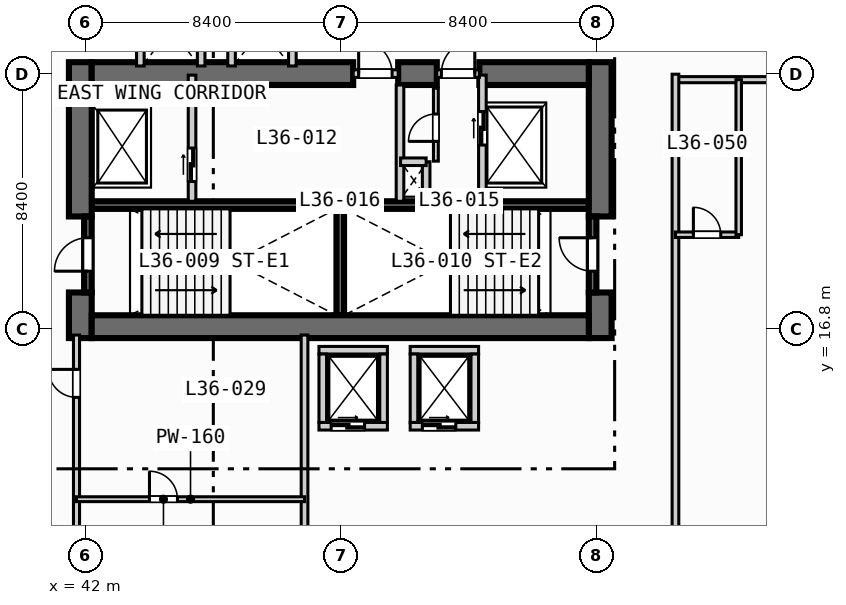
"""IFC4 building model, lengths in metres.
Left out: names, types, materials, properties, quantities, classifications, styles, units other than length and angle.
Written with IfcOpenShell. Run it as: python <this file> out.ifc"""

import sys

from ifc_helpers import new_model, si_unit, direction, frame, frame_2d, origin, place, context, subcontext, project, spatial, rectangle, extrude, element, fill, save


model = new_model("IFC4")
c1 = context("Model", 3, precision=1e-05, world=origin(), true_north=direction((0.0, 1.0)))
c2 = subcontext(c1, "Body", "Model", "MODEL_VIEW")
j1 = project(units=[si_unit("LENGTHUNIT", "METRE"), si_unit("PLANEANGLEUNIT", "RADIAN")], contexts=[c1])
p1 = place(None, origin())
s1 = spatial("IfcSite", under=j1, at=p1, CompositionType="ELEMENT")
p2 = place(p1, origin())
s2 = spatial("IfcBuilding", under=s1, at=p2, CompositionType="ELEMENT")
p3 = place(p2, frame((0.0, 0.0, 149.4)))
s3 = spatial("IfcBuildingStorey", under=s2, at=p3, CompositionType="ELEMENT", Elevation=149.4)
for number, where, z_axis, x_axis in (
    (1, (42.2, 20.875, 0.0), (0.0, 0.0, 1.0), (1.0, 0.0, 0.0)),
    (2, (50.5, 20.875, 0.0), (0.0, 0.0, 1.0), (1.0, 0.0, 0.0)),
):
    element("IfcWall", number, at=place(p3, frame(where, z_axis=z_axis, x_axis=x_axis)), inside=s3, PredefinedType="SOLIDWALL", context=c2, shape_type="SweptSolid", body=[
        extrude(rectangle(XDim=8.05, YDim=0.25, at=frame_2d((4.025, 0.0))), origin(), (0.0, 0.0, 1.0), 3.55),
    ])
p4 = place(p3, frame((50.375, 17.25, 0.0), z_axis=(0.0, 0.0, 1.0), x_axis=(0.0, 1.0, 0.0)))
e3 = element("IfcWall", 3, at=p4, inside=s3, PredefinedType="SOLIDWALL", context=c2, shape_type="SweptSolid", body=[
    extrude(rectangle(XDim=3.5, YDim=0.25, at=frame_2d((1.75, 0.0))), origin(), (0.0, 0.0, 1.0), 3.55),
])
p5 = place(p3, frame((41.825, 16.5, 0.0), z_axis=(0.0, 0.0, 1.0), x_axis=(0.0, 1.0, 0.0)))
e4 = element("IfcWall", 4, at=p5, inside=s3, PredefinedType="SHEAR", context=c2, shape_type="SweptSolid", body=[
    extrude(rectangle(XDim=1.5, YDim=0.75, at=frame_2d((0.75, 0.0))), origin(), (0.0, 0.0, 1.0), 3.55),
])
p6 = place(p3, frame((41.825, 20.5, 0.0), z_axis=(0.0, 0.0, 1.0), x_axis=(0.0, 1.0, 0.0)))
e5 = element("IfcWall", 5, at=p6, inside=s3, PredefinedType="SHEAR", context=c2, shape_type="SweptSolid", body=[
    extrude(rectangle(XDim=5.075, YDim=0.75, at=frame_2d((2.538, 0.0))), origin(), (0.0, 0.0, 1.0), 3.55),
])
p7 = place(p3, frame((58.925, 16.5, 0.0), z_axis=(0.0, 0.0, 1.0), x_axis=(0.0, 1.0, 0.0)))
e6 = element("IfcWall", 6, at=p7, inside=s3, PredefinedType="SHEAR", context=c2, shape_type="SweptSolid", body=[
    extrude(rectangle(XDim=1.5, YDim=0.75, at=frame_2d((0.75, 0.0))), origin(), (0.0, 0.0, 1.0), 3.55),
])
p8 = place(p3, frame((58.925, 20.5, 0.0), z_axis=(0.0, 0.0, 1.0), x_axis=(0.0, 1.0, 0.0)))
e7 = element("IfcWall", 7, at=p8, inside=s3, PredefinedType="SHEAR", context=c2, shape_type="SweptSolid", body=[
    extrude(rectangle(XDim=5.075, YDim=0.75, at=frame_2d((2.538, 0.0))), origin(), (0.0, 0.0, 1.0), 3.55),
])
p9 = place(p3, frame((42.2, 16.875, 0.0), z_axis=(0.0, 0.0, 1.0), x_axis=(1.0, 0.0, 0.0)))
e8 = element("IfcWall", 8, at=p9, inside=s3, PredefinedType="SHEAR", context=c2, shape_type="SweptSolid", body=[
    extrude(rectangle(XDim=16.35, YDim=0.75, at=frame_2d((8.175, 0.0))), origin(), (0.0, 0.0, 1.0), 3.55),
])
p10 = place(p3, frame((42.2, 25.2, 0.0), z_axis=(0.0, 0.0, 1.0), x_axis=(1.0, 0.0, 0.0)))
e9 = element("IfcWall", 9, at=p10, inside=s3, PredefinedType="SHEAR", context=c2, shape_type="SweptSolid", body=[
    extrude(rectangle(XDim=8.6, YDim=0.75, at=frame_2d((4.3, 0.0))), origin(), (0.0, 0.0, 1.0), 3.55),
])
p11 = place(p3, frame((52.28, 25.2, 0.0), z_axis=(0.0, 0.0, 1.0), x_axis=(1.0, 0.0, 0.0)))
e10 = element("IfcWall", 10, at=p11, inside=s3, PredefinedType="SHEAR", context=c2, shape_type="SweptSolid", body=[
    extrude(rectangle(XDim=1.27, YDim=0.75, at=frame_2d((0.635, 0.0))), origin(), (0.0, 0.0, 1.0), 3.55),
])
p12 = place(p3, frame((54.95, 25.2, 0.0), z_axis=(0.0, 0.0, 1.0), x_axis=(1.0, 0.0, 0.0)))
e11 = element("IfcWall", 11, at=p12, inside=s3, PredefinedType="SHEAR", context=c2, shape_type="SweptSolid", body=[
    extrude(rectangle(XDim=3.6, YDim=0.75, at=frame_2d((1.8, 0.0))), origin(), (0.0, 0.0, 1.0), 3.55),
])
p13 = place(p3, frame((42.075, 18.0, 0.0), z_axis=(0.0, 0.0, 1.0), x_axis=(0.0, 1.0, 0.0)))
e12 = element("IfcWall", 12, at=p13, inside=s3, PredefinedType="SOLIDWALL", context=c2, shape_type="SweptSolid", body=[
    extrude(rectangle(XDim=2.5, YDim=0.25, at=frame_2d((1.25, 0.0))), origin(), (0.0, 0.0, 1.0), 3.55),
])
p14 = place(p13, frame((0.7, 0.0, 0.0)))
e13 = element("IfcOpeningElement", 13, at=p14, cuts=e12, PredefinedType="OPENING", context=c2, shape_type="SweptSolid", body=[
    extrude(rectangle(XDim=1.1, YDim=2.15, at=frame_2d((0.55, 1.075))), frame((0.0, 0.135, 0.0), z_axis=(0.0, -1.0, 0.0), x_axis=(1.0, 0.0, 0.0)), (0.0, 0.0, 1.0), 0.27),
])
p15 = place(p3, frame((58.675, 18.0, 0.0), z_axis=(0.0, 0.0, 1.0), x_axis=(0.0, 1.0, 0.0)))
e14 = element("IfcWall", 14, at=p15, inside=s3, PredefinedType="SOLIDWALL", context=c2, shape_type="SweptSolid", body=[
    extrude(rectangle(XDim=2.5, YDim=0.25, at=frame_2d((1.25, 0.0))), origin(), (0.0, 0.0, 1.0), 3.55),
])
p16 = place(p15, frame((0.7, 0.0, 0.0)))
e15 = element("IfcOpeningElement", 15, at=p16, cuts=e14, PredefinedType="OPENING", context=c2, shape_type="SweptSolid", body=[
    extrude(rectangle(XDim=1.1, YDim=2.15, at=frame_2d((0.55, 1.075))), frame((0.0, 0.135, 0.0), z_axis=(0.0, -1.0, 0.0), x_axis=(1.0, 0.0, 0.0)), (0.0, 0.0, 1.0), 0.27),
])
p17 = place(p3, frame((45.5, 21.0, 0.0), z_axis=(0.0, 0.0, 1.0), x_axis=(0.0, 1.0, 0.0)))
e16 = element("IfcWall", 16, at=p17, inside=s3, PredefinedType="SOLIDWALL", context=c2, shape_type="SweptSolid", body=[
    extrude(rectangle(XDim=4.15, YDim=0.25, at=frame_2d((2.075, 0.0))), origin(), (0.0, 0.0, 1.0), 3.55),
])
p18 = place(p17, frame((0.65, 0.0, 0.0)))
e17 = element("IfcOpeningElement", 17, at=p18, cuts=e16, PredefinedType="OPENING", context=c2, shape_type="SweptSolid", body=[
    extrude(rectangle(XDim=1.1, YDim=2.15, at=frame_2d((0.55, 1.075))), frame((0.0, 0.135, 0.0), z_axis=(0.0, -1.0, 0.0), x_axis=(1.0, 0.0, 0.0)), (0.0, 0.0, 1.0), 0.27),
])
p19 = place(p3, frame((50.8, 25.2, 0.0), z_axis=(0.0, 0.0, 1.0), x_axis=(1.0, 0.0, 0.0)))
e18 = element("IfcWall", 18, at=p19, inside=s3, PredefinedType="SOLIDWALL", context=c2, shape_type="SweptSolid", body=[
    extrude(rectangle(XDim=1.48, YDim=0.25, at=frame_2d((0.74, 0.0))), origin(), (0.0, 0.0, 1.0), 3.55),
])
p20 = place(p19, frame((0.18, 0.0, 0.0)))
e19 = element("IfcOpeningElement", 19, at=p20, cuts=e18, PredefinedType="OPENING", context=c2, shape_type="SweptSolid", body=[
    extrude(rectangle(XDim=1.1, YDim=2.15, at=frame_2d((0.55, 1.075))), frame((0.0, 0.135, 0.0), z_axis=(0.0, -1.0, 0.0), x_axis=(1.0, 0.0, 0.0)), (0.0, 0.0, 1.0), 0.27),
])
p21 = place(p3, frame((52.34, 21.0, 0.0), z_axis=(0.0, 0.0, 1.0), x_axis=(0.0, 1.0, 0.0)))
e20 = element("IfcWall", 20, at=p21, inside=s3, PredefinedType="SOLIDWALL", context=c2, shape_type="SweptSolid", body=[
    extrude(rectangle(XDim=3.825, YDim=0.25, at=frame_2d((1.913, 0.0))), origin(), (0.0, 0.0, 1.0), 3.55),
])
p22 = place(p3, frame((55.05, 21.0, 0.0), z_axis=(0.0, 0.0, 1.0), x_axis=(0.0, 1.0, 0.0)))
e21 = element("IfcWall", 21, at=p22, inside=s3, PredefinedType="SOLIDWALL", context=c2, shape_type="SweptSolid", body=[
    extrude(rectangle(XDim=4.15, YDim=0.25, at=frame_2d((2.075, 0.0))), origin(), (0.0, 0.0, 1.0), 3.55),
])
p23 = place(p22, frame((1.85, 0.0, 0.0)))
e22 = element("IfcOpeningElement", 22, at=p23, cuts=e21, PredefinedType="OPENING", context=c2, shape_type="SweptSolid", body=[
    extrude(rectangle(XDim=1.1, YDim=2.15, at=frame_2d((0.55, 1.075))), frame((0.0, 0.135, 0.0), z_axis=(0.0, -1.0, 0.0), x_axis=(1.0, 0.0, 0.0)), (0.0, 0.0, 1.0), 0.27),
])
p24 = place(p3, frame((53.55, 25.2, 0.0), z_axis=(0.0, 0.0, 1.0), x_axis=(1.0, 0.0, 0.0)))
e23 = element("IfcWall", 23, at=p24, inside=s3, PredefinedType="SOLIDWALL", context=c2, shape_type="SweptSolid", body=[
    extrude(rectangle(XDim=1.4, YDim=0.25, at=frame_2d((0.7, 0.0))), origin(), (0.0, 0.0, 1.0), 3.55),
])
p25 = place(p24, frame((0.15, 0.0, 0.0)))
e24 = element("IfcOpeningElement", 24, at=p25, cuts=e23, PredefinedType="OPENING", context=c2, shape_type="SweptSolid", body=[
    extrude(rectangle(XDim=1.1, YDim=2.15, at=frame_2d((0.55, 1.075))), frame((0.0, 0.135, 0.0), z_axis=(0.0, -1.0, 0.0), x_axis=(1.0, 0.0, 0.0)), (0.0, 0.0, 1.0), 0.27),
])
p26 = place(p3, frame((53.2, 21.0, 0.0), z_axis=(0.0, 0.0, 1.0), x_axis=(0.0, 1.0, 0.0)))
e25 = element("IfcWall", 25, at=p26, inside=s3, PredefinedType="SOLIDWALL", context=c2, shape_type="SweptSolid", body=[
    extrude(rectangle(XDim=1.3, YDim=0.25, at=frame_2d((0.65, 0.0))), origin(), (0.0, 0.0, 1.0), 3.55),
])
p27 = place(p3, frame((52.36, 22.3, 0.0), z_axis=(0.0, 0.0, 1.0), x_axis=(1.0, 0.0, 0.0)))
e26 = element("IfcWall", 26, at=p27, inside=s3, PredefinedType="SOLIDWALL", context=c2, shape_type="SweptSolid", body=[
    extrude(rectangle(XDim=0.84, YDim=0.25, at=frame_2d((0.42, 0.0))), origin(), (0.0, 0.0, 1.0), 3.55),
])
p28 = place(p3, frame((53.52, 22.32, 0.0), z_axis=(0.0, 0.0, 1.0), x_axis=(0.0, 1.0, 0.0)))
e27 = element("IfcWall", 27, at=p28, inside=s3, PredefinedType="PARTITIONING", context=c2, shape_type="SweptSolid", body=[
    extrude(rectangle(XDim=2.4, YDim=0.16, at=frame_2d((1.2, 0.0))), origin(), (0.0, 0.0, 1.0), 3.55),
])
p29 = place(p28, frame((0.65, 0.0, 0.0)))
e28 = element("IfcOpeningElement", 28, at=p29, cuts=e27, PredefinedType="OPENING", context=c2, shape_type="SweptSolid", body=[
    extrude(rectangle(XDim=0.9, YDim=2.1, at=frame_2d((0.45, 1.05))), frame((0.0, 0.09, 0.0), z_axis=(0.0, -1.0, 0.0), x_axis=(1.0, 0.0, 0.0)), (0.0, 0.0, 1.0), 0.18),
])
p30 = place(p3, frame((49.675, 13.6, 0.0), z_axis=(0.0, 0.0, 1.0), x_axis=(1.0, 0.0, 0.0)))
e29 = element("IfcWall", 29, at=p30, inside=s3, PredefinedType="SOLIDWALL", context=c2, shape_type="SweptSolid", body=[
    extrude(rectangle(XDim=2.25, YDim=0.25, at=frame_2d((1.125, 0.0))), origin(), (0.0, 0.0, 1.0), 3.55),
])
p31 = place(p30, frame((0.4, 0.0, 0.0)))
e30 = element("IfcOpeningElement", 30, at=p31, cuts=e29, PredefinedType="OPENING", context=c2, shape_type="SweptSolid", body=[
    extrude(rectangle(XDim=1.1, YDim=2.15, at=frame_2d((0.55, 1.075))), frame((0.0, 0.135, 0.0), z_axis=(0.0, -1.0, 0.0), x_axis=(1.0, 0.0, 0.0)), (0.0, 0.0, 1.0), 0.27),
])
for number, where, z_axis, x_axis in (
    (31, (49.675, 16.1, 0.0), (0.0, 0.0, 1.0), (1.0, 0.0, 0.0)),
    (32, (49.8, 13.725, 0.0), (0.0, 0.0, 1.0), (0.0, 1.0, 0.0)),
    (33, (51.8, 13.725, 0.0), (0.0, 0.0, 1.0), (0.0, 1.0, 0.0)),
):
    element("IfcWall", number, at=place(p3, frame(where, z_axis=z_axis, x_axis=x_axis)), inside=s3, PredefinedType="SOLIDWALL", context=c2, shape_type="SweptSolid", body=[
        extrude(rectangle(XDim=2.25, YDim=0.25, at=frame_2d((1.125, 0.0))), origin(), (0.0, 0.0, 1.0), 3.55),
    ])
p32 = place(p3, frame((52.675, 13.6, 0.0), z_axis=(0.0, 0.0, 1.0), x_axis=(1.0, 0.0, 0.0)))
e34 = element("IfcWall", 34, at=p32, inside=s3, PredefinedType="SOLIDWALL", context=c2, shape_type="SweptSolid", body=[
    extrude(rectangle(XDim=2.25, YDim=0.25, at=frame_2d((1.125, 0.0))), origin(), (0.0, 0.0, 1.0), 3.55),
])
p33 = place(p32, frame((0.4, 0.0, 0.0)))
e35 = element("IfcOpeningElement", 35, at=p33, cuts=e34, PredefinedType="OPENING", context=c2, shape_type="SweptSolid", body=[
    extrude(rectangle(XDim=1.1, YDim=2.15, at=frame_2d((0.55, 1.075))), frame((0.0, 0.135, 0.0), z_axis=(0.0, -1.0, 0.0), x_axis=(1.0, 0.0, 0.0)), (0.0, 0.0, 1.0), 0.27),
])
for number, where, z_axis, x_axis in (
    (36, (52.675, 16.1, 0.0), (0.0, 0.0, 1.0), (1.0, 0.0, 0.0)),
    (37, (52.8, 13.725, 0.0), (0.0, 0.0, 1.0), (0.0, 1.0, 0.0)),
    (38, (54.8, 13.725, 0.0), (0.0, 0.0, 1.0), (0.0, 1.0, 0.0)),
):
    element("IfcWall", number, at=place(p3, frame(where, z_axis=z_axis, x_axis=x_axis)), inside=s3, PredefinedType="SOLIDWALL", context=c2, shape_type="SweptSolid", body=[
        extrude(rectangle(XDim=2.25, YDim=0.25, at=frame_2d((1.125, 0.0))), origin(), (0.0, 0.0, 1.0), 3.55),
    ])
for number, where, z_axis, x_axis in (
    (39, (43.8, 25.45, 0.0), (0.0, 0.0, 1.0), (0.0, 1.0, 0.0)),
    (40, (45.8, 25.45, 0.0), (0.0, 0.0, 1.0), (0.0, 1.0, 0.0)),
    (41, (46.8, 25.45, 0.0), (0.0, 0.0, 1.0), (0.0, 1.0, 0.0)),
    (42, (48.8, 25.45, 0.0), (0.0, 0.0, 1.0), (0.0, 1.0, 0.0)),
):
    element("IfcWall", number, at=place(p3, frame(where, z_axis=z_axis, x_axis=x_axis)), inside=s3, PredefinedType="SOLIDWALL", context=c2, shape_type="SweptSolid", body=[
        extrude(rectangle(XDim=2.325, YDim=0.25, at=frame_2d((1.163, 0.0))), origin(), (0.0, 0.0, 1.0), 3.55),
    ])
p34 = place(p3, frame((41.7, 0.35, 0.0), z_axis=(0.0, 0.0, 1.0), x_axis=(0.0, 1.0, 0.0)))
e43 = element("IfcWall", 43, at=p34, inside=s3, PredefinedType="PARTITIONING", context=c2, shape_type="SweptSolid", body=[
    extrude(rectangle(XDim=16.25, YDim=0.2, at=frame_2d((8.125, 0.0))), origin(), (0.0, 0.0, 1.0), 2.9),
])
p35 = place(p34, frame((14.2, 0.0, 0.0)))
e44 = element("IfcOpeningElement", 44, at=p35, cuts=e43, PredefinedType="OPENING", context=c2, shape_type="SweptSolid", body=[
    extrude(rectangle(XDim=0.92, YDim=2.1, at=frame_2d((0.46, 1.05))), frame((0.0, 0.11, 0.0), z_axis=(0.0, -1.0, 0.0), x_axis=(1.0, 0.0, 0.0)), (0.0, 0.0, 1.0), 0.22),
])
p36 = place(p3, frame((49.2, 0.35, 0.0), z_axis=(0.0, 0.0, 1.0), x_axis=(0.0, 1.0, 0.0)))
e45 = element("IfcWall", 45, at=p36, inside=s3, PredefinedType="PARTITIONING", context=c2, shape_type="SweptSolid", body=[
    extrude(rectangle(XDim=16.25, YDim=0.22, at=frame_2d((8.125, 0.0))), origin(), (0.0, 0.0, 1.0), 3.55),
])
p37 = place(p3, frame((41.7, 11.2, 0.0), z_axis=(0.0, 0.0, 1.0), x_axis=(1.0, 0.0, 0.0)))
e46 = element("IfcWall", 46, at=p37, inside=s3, PredefinedType="PARTITIONING", context=c2, shape_type="SweptSolid", body=[
    extrude(rectangle(XDim=7.5, YDim=0.16, at=frame_2d((3.75, 0.0))), origin(), (0.0, 0.0, 1.0), 3.55),
])
p38 = place(p37, frame((2.4, 0.0, 0.0)))
e47 = element("IfcOpeningElement", 47, at=p38, cuts=e46, PredefinedType="OPENING", context=c2, shape_type="SweptSolid", body=[
    extrude(rectangle(XDim=0.92, YDim=2.1, at=frame_2d((0.46, 1.05))), frame((0.0, 0.09, 0.0), z_axis=(0.0, -1.0, 0.0), x_axis=(1.0, 0.0, 0.0)), (0.0, 0.0, 1.0), 0.18),
])
p39 = place(p3, frame((61.4, 25.0, 0.0), z_axis=(0.0, 0.0, 1.0), x_axis=(1.0, 0.0, 0.0)))
e48 = element("IfcWall", 48, at=p39, inside=s3, PredefinedType="PARTITIONING", context=c2, shape_type="SweptSolid", body=[
    extrude(rectangle(XDim=10.8, YDim=0.2, at=frame_2d((5.4, 0.0))), origin(), (0.0, 0.0, 1.0), 2.9),
])
p40 = place(p39, frame((3.18, 0.0, 0.0)))
e49 = element("IfcOpeningElement", 49, at=p40, cuts=e48, PredefinedType="OPENING", context=c2, shape_type="SweptSolid", body=[
    extrude(rectangle(XDim=1.0, YDim=2.15, at=frame_2d((0.5, 1.075))), frame((0.0, 0.11, 0.0), z_axis=(0.0, -1.0, 0.0), x_axis=(1.0, 0.0, 0.0)), (0.0, 0.0, 1.0), 0.22),
])
p41 = place(p39, frame((6.84, 0.0, 0.0)))
e50 = element("IfcOpeningElement", 50, at=p41, cuts=e48, PredefinedType="OPENING", context=c2, shape_type="SweptSolid", body=[
    extrude(rectangle(XDim=1.0, YDim=2.15, at=frame_2d((0.5, 1.075))), frame((0.0, 0.11, 0.0), z_axis=(0.0, -1.0, 0.0), x_axis=(1.0, 0.0, 0.0)), (0.0, 0.0, 1.0), 0.22),
])
p42 = place(p3, frame((61.4, 0.2, 0.0), z_axis=(0.0, 0.0, 1.0), x_axis=(0.0, 1.0, 0.0)))
e51 = element("IfcWall", 51, at=p42, inside=s3, PredefinedType="PARTITIONING", context=c2, shape_type="SweptSolid", body=[
    extrude(rectangle(XDim=24.98, YDim=0.22, at=frame_2d((12.49, 0.0))), origin(), (0.0, 0.0, 1.0), 3.55),
])
p43 = place(p3, frame((61.4, 19.9, 0.0), z_axis=(0.0, 0.0, 1.0), x_axis=(1.0, 0.0, 0.0)))
e52 = element("IfcWall", 52, at=p43, inside=s3, PredefinedType="PLUMBINGWALL", context=c2, shape_type="SweptSolid", body=[
    extrude(rectangle(XDim=2.08, YDim=0.18, at=frame_2d((1.04, 0.0))), origin(), (0.0, 0.0, 1.0), 3.55),
])
p44 = place(p43, frame((0.59, 0.0, 0.0)))
e53 = element("IfcOpeningElement", 53, at=p44, cuts=e52, PredefinedType="OPENING", context=c2, shape_type="SweptSolid", body=[
    extrude(rectangle(XDim=0.9, YDim=2.1, at=frame_2d((0.45, 1.05))), frame((0.0, 0.1, 0.0), z_axis=(0.0, -1.0, 0.0), x_axis=(1.0, 0.0, 0.0)), (0.0, 0.0, 1.0), 0.2),
])
p45 = place(p3, frame((63.48, 19.9, 0.0), z_axis=(0.0, 0.0, 1.0), x_axis=(0.0, 1.0, 0.0)))
e54 = element("IfcWall", 54, at=p45, inside=s3, PredefinedType="PLUMBINGWALL", context=c2, shape_type="SweptSolid", body=[
    extrude(rectangle(XDim=5.1, YDim=0.18, at=frame_2d((2.55, 0.0))), origin(), (0.0, 0.0, 1.0), 3.55),
])
p46 = place(p14, origin())
e55 = element("IfcDoor", 55, at=p46, inside=s3, OperationType="SINGLE_SWING_LEFT", PredefinedType="DOOR", context=c2, shape_type="SweptSolid", body=[
    extrude(rectangle(XDim=1.1, YDim=2.15, at=frame_2d((0.55, 1.075))), frame((0.0, 0.025, 0.0), z_axis=(0.0, -1.0, 0.0), x_axis=(1.0, 0.0, 0.0)), (0.0, 0.0, 1.0), 0.05),
])
fill(e13, e55)
p47 = place(p16, origin())
e56 = element("IfcDoor", 56, at=p47, inside=s3, OperationType="SINGLE_SWING_RIGHT", PredefinedType="DOOR", context=c2, shape_type="SweptSolid", body=[
    extrude(rectangle(XDim=1.1, YDim=2.15, at=frame_2d((0.55, 1.075))), frame((0.0, 0.025, 0.0), z_axis=(0.0, -1.0, 0.0), x_axis=(1.0, 0.0, 0.0)), (0.0, 0.0, 1.0), 0.05),
])
fill(e15, e56)
p48 = place(p18, origin())
e57 = element("IfcDoor", 57, at=p48, inside=s3, OperationType="SLIDING_TO_LEFT", PredefinedType="DOOR", context=c2, shape_type="SweptSolid", body=[
    extrude(rectangle(XDim=1.1, YDim=2.15, at=frame_2d((0.55, 1.075))), frame((0.0, 0.025, 0.0), z_axis=(0.0, -1.0, 0.0), x_axis=(1.0, 0.0, 0.0)), (0.0, 0.0, 1.0), 0.05),
])
fill(e17, e57)
p49 = place(p20, origin())
e58 = element("IfcDoor", 58, at=p49, inside=s3, OperationType="SINGLE_SWING_LEFT", PredefinedType="DOOR", context=c2, shape_type="SweptSolid", body=[
    extrude(rectangle(XDim=1.1, YDim=2.15, at=frame_2d((0.55, 1.075))), frame((0.0, 0.025, 0.0), z_axis=(0.0, -1.0, 0.0), x_axis=(1.0, 0.0, 0.0)), (0.0, 0.0, 1.0), 0.05),
])
fill(e19, e58)
p50 = place(p23, origin())
e59 = element("IfcDoor", 59, at=p50, inside=s3, OperationType="SLIDING_TO_LEFT", PredefinedType="DOOR", context=c2, shape_type="SweptSolid", body=[
    extrude(rectangle(XDim=1.1, YDim=2.15, at=frame_2d((0.55, 1.075))), frame((0.0, 0.025, 0.0), z_axis=(0.0, -1.0, 0.0), x_axis=(1.0, 0.0, 0.0)), (0.0, 0.0, 1.0), 0.05),
])
fill(e22, e59)
p51 = place(p25, origin())
e60 = element("IfcDoor", 60, at=p51, inside=s3, OperationType="SINGLE_SWING_RIGHT", PredefinedType="DOOR", context=c2, shape_type="SweptSolid", body=[
    extrude(rectangle(XDim=1.1, YDim=2.15, at=frame_2d((0.55, 1.075))), frame((0.0, 0.025, 0.0), z_axis=(0.0, -1.0, 0.0), x_axis=(1.0, 0.0, 0.0)), (0.0, 0.0, 1.0), 0.05),
])
fill(e24, e60)
p52 = place(p29, origin())
e61 = element("IfcDoor", 61, at=p52, inside=s3, OperationType="SINGLE_SWING_LEFT", PredefinedType="DOOR", context=c2, shape_type="SweptSolid", body=[
    extrude(rectangle(XDim=0.9, YDim=2.1, at=frame_2d((0.45, 1.05))), frame((0.0, 0.025, 0.0), z_axis=(0.0, -1.0, 0.0), x_axis=(1.0, 0.0, 0.0)), (0.0, 0.0, 1.0), 0.05),
])
fill(e28, e61)
p53 = place(p31, origin())
e62 = element("IfcDoor", 62, at=p53, inside=s3, OperationType="SLIDING_TO_LEFT", PredefinedType="DOOR", context=c2, shape_type="SweptSolid", body=[
    extrude(rectangle(XDim=1.1, YDim=2.15, at=frame_2d((0.55, 1.075))), frame((0.0, 0.025, 0.0), z_axis=(0.0, -1.0, 0.0), x_axis=(1.0, 0.0, 0.0)), (0.0, 0.0, 1.0), 0.05),
])
fill(e30, e62)
p54 = place(p33, origin())
e63 = element("IfcDoor", 63, at=p54, inside=s3, OperationType="SLIDING_TO_LEFT", PredefinedType="DOOR", context=c2, shape_type="SweptSolid", body=[
    extrude(rectangle(XDim=1.1, YDim=2.15, at=frame_2d((0.55, 1.075))), frame((0.0, 0.025, 0.0), z_axis=(0.0, -1.0, 0.0), x_axis=(1.0, 0.0, 0.0)), (0.0, 0.0, 1.0), 0.05),
])
fill(e35, e63)
p55 = place(p35, origin())
e64 = element("IfcDoor", 64, at=p55, inside=s3, OperationType="SINGLE_SWING_RIGHT", PredefinedType="DOOR", context=c2, shape_type="SweptSolid", body=[
    extrude(rectangle(XDim=0.92, YDim=2.1, at=frame_2d((0.46, 1.05))), frame((0.0, 0.025, 0.0), z_axis=(0.0, -1.0, 0.0), x_axis=(1.0, 0.0, 0.0)), (0.0, 0.0, 1.0), 0.05),
])
fill(e44, e64)
p56 = place(p38, origin())
e65 = element("IfcDoor", 65, at=p56, inside=s3, OperationType="SINGLE_SWING_LEFT", PredefinedType="DOOR", context=c2, shape_type="SweptSolid", body=[
    extrude(rectangle(XDim=0.92, YDim=2.1, at=frame_2d((0.46, 1.05))), frame((0.0, 0.025, 0.0), z_axis=(0.0, -1.0, 0.0), x_axis=(1.0, 0.0, 0.0)), (0.0, 0.0, 1.0), 0.05),
])
fill(e47, e65)
p57 = place(p44, origin())
e66 = element("IfcDoor", 66, at=p57, inside=s3, OperationType="SINGLE_SWING_LEFT", PredefinedType="DOOR", context=c2, shape_type="SweptSolid", body=[
    extrude(rectangle(XDim=0.9, YDim=2.1, at=frame_2d((0.45, 1.05))), frame((0.0, 0.025, 0.0), z_axis=(0.0, -1.0, 0.0), x_axis=(1.0, 0.0, 0.0)), (0.0, 0.0, 1.0), 0.05),
])
fill(e53, e66)
save(model, sys.argv[1])
